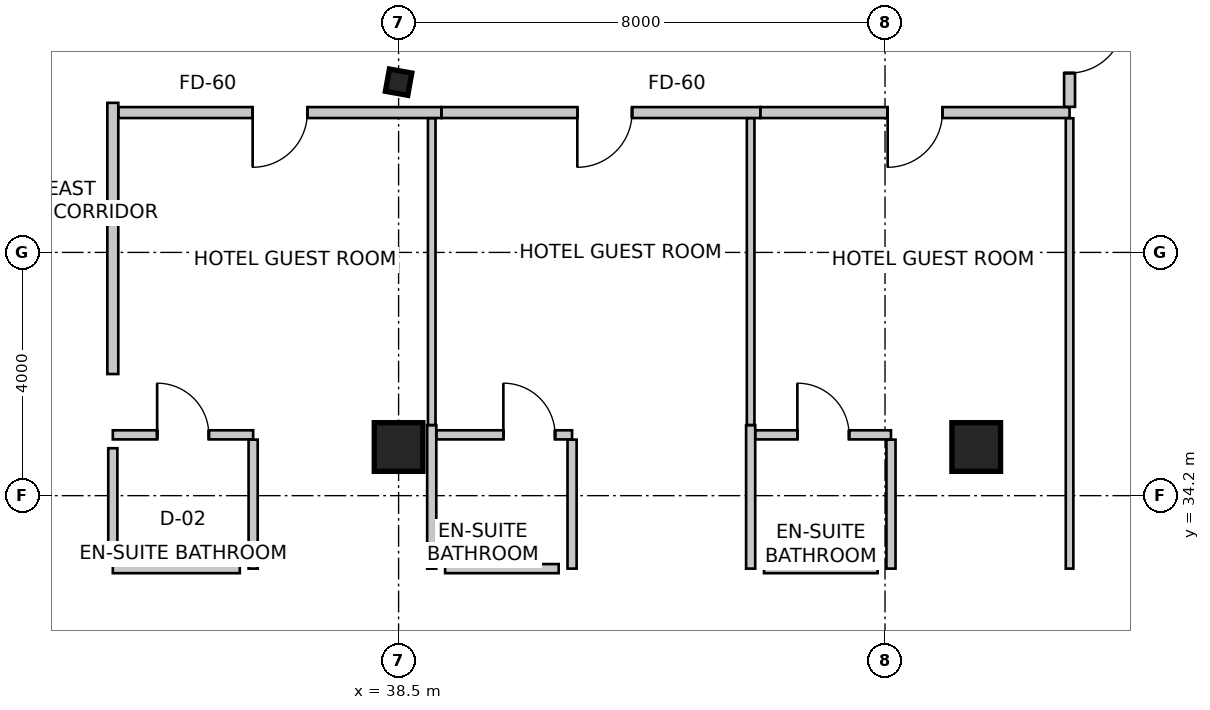
"""IFC4 building model, lengths in metres.
Left out: names, types, materials, properties, quantities, classifications, styles, units other than length and angle.
Written with IfcOpenShell. Run it as: python <this file> out.ifc"""

import sys

from ifc_helpers import new_model, si_unit, direction, frame, frame_2d, origin, origin_2d, place, context, subcontext, project, spatial, rectangle, i_section, extrude, source, transform, mapped, element, fill, save


model = new_model("IFC4")
c1 = context("Model", 3, precision=1e-05, world=origin(), true_north=direction((0.0, 1.0)))
c2 = subcontext(c1, "Body", "Model", "MODEL_VIEW")
j1 = project(units=[si_unit("LENGTHUNIT", "METRE"), si_unit("PLANEANGLEUNIT", "RADIAN")], contexts=[c1])
p1 = place(None, origin())
s1 = spatial("IfcSite", under=j1, at=p1, CompositionType="ELEMENT")
p2 = place(p1, origin())
s2 = spatial("IfcBuilding", under=s1, at=p2, CompositionType="ELEMENT")
p3 = place(p2, frame((0.0, 0.0, 125.0)))
s3 = spatial("IfcBuildingStorey", under=s2, at=p3, CompositionType="ELEMENT", Elevation=125.0)
m1 = source(origin(), c2, "Body", "SweptSolid", [
    extrude(rectangle(XDim=0.8, YDim=0.8, at=origin_2d()), origin(), (0.0, 0.0, 1.0), 3.6),
])
for number, where, z_axis, x_axis in (
    (1, (38.5, 35.0, 0.0), (0.0, 0.0, 1.0), (1.0, 0.0, 0.0)),
    (2, (48.0, 35.0, 0.0), (0.0, 0.0, 1.0), (1.0, 0.0, 0.0)),
):
    element("IfcColumn", number, at=place(p3, frame(where, z_axis=z_axis, x_axis=x_axis)), inside=s3, PredefinedType="COLUMN", context=c2, shape_type="MappedRepresentation", body=[
        mapped(m1, transform((0.0, 0.0, 0.0), scale=1.0)),
    ])
m2 = source(origin(), c2, "Body", "SweptSolid", [
    extrude(i_section(OverallWidth=0.374, OverallDepth=0.372, WebThickness=0.016, FlangeThickness=0.026, FilletRadius=0.015, at=origin_2d()), origin(), (0.0, 0.0, 1.0), 3.6),
])
p4 = place(p3, frame((38.5, 41.0, 0.0), z_axis=(0.0, 0.0, 1.0), x_axis=(0.984195607969, -0.17708474032, 0.0)))
e3 = element("IfcColumn", 3, at=p4, inside=s3, PredefinedType="COLUMN", context=c2, shape_type="MappedRepresentation", body=[
    mapped(m2, transform((0.0, 0.0, 0.0), scale=1.0)),
])
p5 = place(p3, frame((33.8, 40.66, 0.0), z_axis=(0.0, 0.0, 1.0), x_axis=(0.0, -1.0, 0.0)))
e4 = element("IfcWall", 4, at=p5, inside=s3, PredefinedType="PARTITIONING", context=c2, shape_type="SweptSolid", body=[
    extrude(rectangle(XDim=4.46, YDim=0.18, at=frame_2d((2.23, 0.0))), origin(), (0.0, 0.0, 1.0), 3.35),
])
p6 = place(p3, frame((39.205, 40.5, 0.0), z_axis=(0.0, 0.0, 1.0), x_axis=(-1.0, 0.0, 0.0)))
e5 = element("IfcWall", 5, at=p6, inside=s3, PredefinedType="PARTITIONING", context=c2, shape_type="SweptSolid", body=[
    extrude(rectangle(XDim=5.311, YDim=0.18, at=frame_2d((2.656, 0.0))), origin(), (0.0, 0.0, 1.0), 2.803),
])
m3 = source(origin(), c2, "Body", "SweptSolid", [
    extrude(rectangle(XDim=0.9, YDim=2.15, at=frame_2d((0.45, 1.075))), frame((0.0, 0.1, 0.0), z_axis=(0.0, -1.0, 0.0), x_axis=(1.0, 0.0, 0.0)), (0.0, 0.0, 1.0), 0.2),
])
p7 = place(p6, frame((2.206, 0.0, 0.0)))
e6 = element("IfcOpeningElement", 6, at=p7, cuts=e5, PredefinedType="OPENING", context=c2, shape_type="MappedRepresentation", body=[
    mapped(m3, transform((0.0, 0.0, 0.0), scale=1.0)),
])
p8 = place(p3, frame((44.45, 40.5, 0.0), z_axis=(0.0, 0.0, 1.0), x_axis=(-1.0, 0.0, 0.0)))
e7 = element("IfcWall", 7, at=p8, inside=s3, PredefinedType="PARTITIONING", context=c2, shape_type="SweptSolid", body=[
    extrude(rectangle(XDim=5.243, YDim=0.18, at=frame_2d((2.622, 0.0))), origin(), (0.0, 0.0, 1.0), 2.788),
])
p9 = place(p8, frame((2.111, 0.0, 0.0)))
e8 = element("IfcOpeningElement", 8, at=p9, cuts=e7, PredefinedType="OPENING", context=c2, shape_type="MappedRepresentation", body=[
    mapped(m3, transform((0.0, 0.0, 0.0), scale=1.0)),
])
p10 = place(p3, frame((49.535, 40.5, 0.0), z_axis=(0.0, 0.0, 1.0), x_axis=(-1.0, 0.0, 0.0)))
e9 = element("IfcWall", 9, at=p10, inside=s3, PredefinedType="PARTITIONING", context=c2, shape_type="SweptSolid", body=[
    extrude(rectangle(XDim=5.083, YDim=0.18, at=frame_2d((2.542, 0.0))), origin(), (0.0, 0.0, 1.0), 2.803),
])
p11 = place(p10, frame((2.092, 0.0, 0.0)))
e10 = element("IfcOpeningElement", 10, at=p11, cuts=e9, PredefinedType="OPENING", context=c2, shape_type="MappedRepresentation", body=[
    mapped(m3, transform((0.0, 0.0, 0.0), scale=1.0)),
])
p12 = place(p3, frame((49.535, 42.606, 0.0), z_axis=(0.0, 0.0, 1.0), x_axis=(0.0, -1.0, 0.0)))
e11 = element("IfcWall", 11, at=p12, inside=s3, PredefinedType="PARTITIONING", context=c2, shape_type="SweptSolid", body=[
    extrude(rectangle(XDim=2.012, YDim=0.18, at=frame_2d((1.006, 0.0))), origin(), (0.0, 0.0, 1.0), 3.35),
])
p13 = place(p12, frame((0.556, 0.0, 0.0)))
e12 = element("IfcOpeningElement", 12, at=p13, cuts=e11, PredefinedType="OPENING", context=c2, shape_type="MappedRepresentation", body=[
    mapped(m3, transform((0.0, 0.0, 0.0), scale=1.0)),
])
p14 = place(p3, frame((33.8, 35.2, 0.0), z_axis=(0.0, 0.0, 1.0), x_axis=(1.0, 0.0, 0.0)))
e13 = element("IfcWall", 13, at=p14, inside=s3, PredefinedType="PARTITIONING", context=c2, shape_type="SweptSolid", body=[
    extrude(rectangle(XDim=2.308, YDim=0.15, at=frame_2d((1.154, 0.0))), origin(), (0.0, 0.0, 1.0), 3.35),
])
m4 = source(origin(), c2, "Body", "SweptSolid", [
    extrude(rectangle(XDim=0.85, YDim=2.15, at=frame_2d((0.425, 1.075))), frame((0.0, 0.085, 0.0), z_axis=(0.0, -1.0, 0.0), x_axis=(1.0, 0.0, 0.0)), (0.0, 0.0, 1.0), 0.17),
])
p15 = place(p14, frame((0.729, 0.0, 0.0)))
e14 = element("IfcOpeningElement", 14, at=p15, cuts=e13, PredefinedType="OPENING", context=c2, shape_type="MappedRepresentation", body=[
    mapped(m4, transform((0.0, 0.0, 0.0), scale=1.0)),
])
p16 = place(p3, frame((36.108, 35.121, 0.0), z_axis=(0.0, 0.0, 1.0), x_axis=(0.0, -1.0, 0.0)))
e15 = element("IfcWall", 15, at=p16, inside=s3, PredefinedType="PARTITIONING", context=c2, shape_type="SweptSolid", body=[
    extrude(rectangle(XDim=2.121, YDim=0.15, at=frame_2d((1.061, 0.0))), origin(), (0.0, 0.0, 1.0), 3.35),
])
p17 = place(p3, frame((39.045, 35.36, 0.0), z_axis=(0.0, 0.0, 1.0), x_axis=(0.0, -1.0, 0.0)))
e16 = element("IfcWall", 16, at=p17, inside=s3, PredefinedType="PARTITIONING", context=c2, shape_type="SweptSolid", body=[
    extrude(rectangle(XDim=2.36, YDim=0.15, at=frame_2d((1.18, 0.0))), origin(), (0.0, 0.0, 1.0), 2.492),
])
p18 = place(p3, frame((39.045, 40.406, 0.0), z_axis=(0.0, 0.0, 1.0), x_axis=(0.0, -1.0, 0.0)))
e17 = element("IfcWall", 17, at=p18, inside=s3, PredefinedType="PARTITIONING", context=c2, shape_type="SweptSolid", body=[
    extrude(rectangle(XDim=5.044, YDim=0.125, at=frame_2d((2.522, 0.0))), origin(), (0.0, 0.0, 1.0), 2.788),
])
p19 = place(p3, frame((39.124, 35.2, 0.0), z_axis=(0.0, 0.0, 1.0), x_axis=(1.0, 0.0, 0.0)))
e18 = element("IfcWall", 18, at=p19, inside=s3, PredefinedType="PARTITIONING", context=c2, shape_type="SweptSolid", body=[
    extrude(rectangle(XDim=2.229, YDim=0.15, at=frame_2d((1.115, 0.0))), origin(), (0.0, 0.0, 1.0), 2.492),
])
p20 = place(p19, frame((1.099, 0.0, 0.0)))
e19 = element("IfcOpeningElement", 19, at=p20, cuts=e18, PredefinedType="OPENING", context=c2, shape_type="MappedRepresentation", body=[
    mapped(m4, transform((0.0, 0.0, 0.0), scale=1.0)),
])
p21 = place(p3, frame((41.353, 35.121, 0.0), z_axis=(0.0, 0.0, 1.0), x_axis=(0.0, -1.0, 0.0)))
e20 = element("IfcWall", 20, at=p21, inside=s3, PredefinedType="PARTITIONING", context=c2, shape_type="SweptSolid", body=[
    extrude(rectangle(XDim=2.121, YDim=0.15, at=frame_2d((1.061, 0.0))), origin(), (0.0, 0.0, 1.0), 2.492),
])
p22 = place(p3, frame((44.29, 35.36, 0.0), z_axis=(0.0, 0.0, 1.0), x_axis=(0.0, -1.0, 0.0)))
e21 = element("IfcWall", 21, at=p22, inside=s3, PredefinedType="PARTITIONING", context=c2, shape_type="SweptSolid", body=[
    extrude(rectangle(XDim=2.36, YDim=0.15, at=frame_2d((1.18, 0.0))), origin(), (0.0, 0.0, 1.0), 2.492),
])
p23 = place(p3, frame((44.29, 40.406, 0.0), z_axis=(0.0, 0.0, 1.0), x_axis=(0.0, -1.0, 0.0)))
e22 = element("IfcWall", 22, at=p23, inside=s3, PredefinedType="PARTITIONING", context=c2, shape_type="SweptSolid", body=[
    extrude(rectangle(XDim=5.044, YDim=0.125, at=frame_2d((2.522, 0.0))), origin(), (0.0, 0.0, 1.0), 2.788),
])
p24 = place(p3, frame((44.369, 35.2, 0.0), z_axis=(0.0, 0.0, 1.0), x_axis=(1.0, 0.0, 0.0)))
e23 = element("IfcWall", 23, at=p24, inside=s3, PredefinedType="PARTITIONING", context=c2, shape_type="SweptSolid", body=[
    extrude(rectangle(XDim=2.229, YDim=0.15, at=frame_2d((1.115, 0.0))), origin(), (0.0, 0.0, 1.0), 2.492),
])
p25 = place(p24, frame((0.689, 0.0, 0.0)))
e24 = element("IfcOpeningElement", 24, at=p25, cuts=e23, PredefinedType="OPENING", context=c2, shape_type="MappedRepresentation", body=[
    mapped(m4, transform((0.0, 0.0, 0.0), scale=1.0)),
])
p26 = place(p3, frame((46.598, 35.121, 0.0), z_axis=(0.0, 0.0, 1.0), x_axis=(0.0, -1.0, 0.0)))
e25 = element("IfcWall", 25, at=p26, inside=s3, PredefinedType="PARTITIONING", context=c2, shape_type="SweptSolid", body=[
    extrude(rectangle(XDim=2.121, YDim=0.15, at=frame_2d((1.061, 0.0))), origin(), (0.0, 0.0, 1.0), 2.492),
])
p27 = place(p3, frame((49.535, 40.406, 0.0), z_axis=(0.0, 0.0, 1.0), x_axis=(0.0, -1.0, 0.0)))
e26 = element("IfcWall", 26, at=p27, inside=s3, PredefinedType="PARTITIONING", context=c2, shape_type="SweptSolid", body=[
    extrude(rectangle(XDim=7.406, YDim=0.125, at=frame_2d((3.703, 0.0))), origin(), (0.0, 0.0, 1.0), 3.35),
])
p28 = place(p3, frame((35.888, 33.0, 0.0), z_axis=(0.0, 0.0, 1.0), x_axis=(-1.0, 0.0, 0.0)))
e27 = element("IfcWall", 27, at=p28, inside=s3, PredefinedType="PARTITIONING", context=c2, shape_type="SweptSolid", body=[
    extrude(rectangle(XDim=2.088, YDim=0.15, at=frame_2d((1.044, 0.0))), origin(), (0.0, 0.0, 1.0), 3.35),
])
p29 = place(p3, frame((33.8, 33.22, 0.0), z_axis=(0.0, 0.0, 1.0), x_axis=(0.0, 1.0, 0.0)))
e28 = element("IfcWall", 28, at=p29, inside=s3, PredefinedType="PARTITIONING", context=c2, shape_type="SweptSolid", body=[
    extrude(rectangle(XDim=1.76, YDim=0.15, at=frame_2d((0.88, 0.0))), origin(), (0.0, 0.0, 1.0), 3.35),
])
p30 = place(p3, frame((41.133, 33.0, 0.0), z_axis=(0.0, 0.0, 1.0), x_axis=(-1.0, 0.0, 0.0)))
e29 = element("IfcWall", 29, at=p30, inside=s3, PredefinedType="PARTITIONING", context=c2, shape_type="SweptSolid", body=[
    extrude(rectangle(XDim=1.868, YDim=0.15, at=frame_2d((0.934, 0.0))), origin(), (0.0, 0.0, 1.0), 3.35),
])
p31 = place(p3, frame((46.378, 33.0, 0.0), z_axis=(0.0, 0.0, 1.0), x_axis=(-1.0, 0.0, 0.0)))
e30 = element("IfcWall", 30, at=p31, inside=s3, PredefinedType="PARTITIONING", context=c2, shape_type="SweptSolid", body=[
    extrude(rectangle(XDim=1.868, YDim=0.15, at=frame_2d((0.934, 0.0))), origin(), (0.0, 0.0, 1.0), 3.35),
])
m5 = source(origin(), c2, "Body", "SweptSolid", [
    extrude(rectangle(XDim=0.85, YDim=2.15, at=frame_2d((0.425, 1.075))), frame((0.0, 0.025, 0.0), z_axis=(0.0, -1.0, 0.0), x_axis=(1.0, 0.0, 0.0)), (0.0, 0.0, 1.0), 0.05),
])
p32 = place(p15, origin())
e31 = element("IfcDoor", 31, at=p32, inside=s3, OperationType="SINGLE_SWING_LEFT", PredefinedType="DOOR", context=c2, shape_type="MappedRepresentation", body=[
    mapped(m5, transform((0.0, 0.0, 0.0), scale=1.0)),
])
fill(e14, e31)
m6 = source(origin(), c2, "Body", "SweptSolid", [
    extrude(rectangle(XDim=0.9, YDim=2.15, at=frame_2d((0.45, 1.075))), frame((0.0, 0.025, 0.0), z_axis=(0.0, -1.0, 0.0), x_axis=(1.0, 0.0, 0.0)), (0.0, 0.0, 1.0), 0.05),
])
p33 = place(p7, origin())
e32 = element("IfcDoor", 32, at=p33, inside=s3, OperationType="SINGLE_SWING_RIGHT", PredefinedType="DOOR", context=c2, shape_type="MappedRepresentation", body=[
    mapped(m6, transform((0.0, 0.0, 0.0), scale=1.0)),
])
fill(e6, e32)
p34 = place(p20, origin())
e33 = element("IfcDoor", 33, at=p34, inside=s3, OperationType="SINGLE_SWING_LEFT", PredefinedType="DOOR", context=c2, shape_type="MappedRepresentation", body=[
    mapped(m5, transform((0.0, 0.0, 0.0), scale=1.0)),
])
fill(e19, e33)
p35 = place(p9, origin())
e34 = element("IfcDoor", 34, at=p35, inside=s3, OperationType="SINGLE_SWING_RIGHT", PredefinedType="DOOR", context=c2, shape_type="MappedRepresentation", body=[
    mapped(m6, transform((0.0, 0.0, 0.0), scale=1.0)),
])
fill(e8, e34)
p36 = place(p25, origin())
e35 = element("IfcDoor", 35, at=p36, inside=s3, OperationType="SINGLE_SWING_LEFT", PredefinedType="DOOR", context=c2, shape_type="MappedRepresentation", body=[
    mapped(m5, transform((0.0, 0.0, 0.0), scale=1.0)),
])
fill(e24, e35)
p37 = place(p11, origin())
e36 = element("IfcDoor", 36, at=p37, inside=s3, OperationType="SINGLE_SWING_RIGHT", PredefinedType="DOOR", context=c2, shape_type="MappedRepresentation", body=[
    mapped(m6, transform((0.0, 0.0, 0.0), scale=1.0)),
])
fill(e10, e36)
p38 = place(p13, origin())
e37 = element("IfcDoor", 37, at=p38, inside=s3, OperationType="SINGLE_SWING_LEFT", PredefinedType="DOOR", context=c2, shape_type="MappedRepresentation", body=[
    mapped(m6, transform((0.0, 0.0, 0.0), scale=1.0)),
])
fill(e12, e37)
save(model, sys.argv[1])
